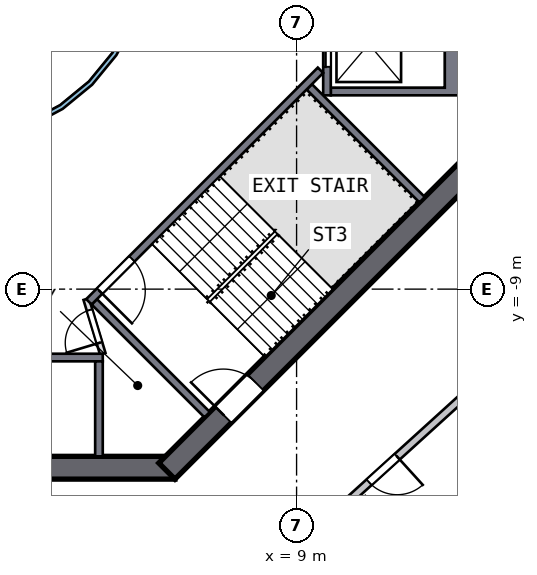
"""IFC4 building model, lengths in metres.
Left out: names, types, materials, properties, quantities, classifications, styles, units other than length and angle.
Written with IfcOpenShell. Run it as: python <this file> out.ifc"""

import sys

from ifc_helpers import new_model, si_unit, direction, frame, frame_2d, origin, place, context, subcontext, project, spatial, polyline, rectangle, outline, extrude, element, fill, save


model = new_model("IFC4")
c1 = context("Model", 3, precision=1e-05, world=origin(), true_north=direction((0.0, 1.0)))
c2 = subcontext(c1, "Body", "Model", "MODEL_VIEW")
j1 = project(units=[si_unit("LENGTHUNIT", "METRE"), si_unit("PLANEANGLEUNIT", "RADIAN")], contexts=[c1])
p1 = place(None, origin())
s1 = spatial("IfcSite", under=j1, at=p1, CompositionType="ELEMENT")
p2 = place(p1, origin())
s2 = spatial("IfcBuilding", under=s1, at=p2, CompositionType="ELEMENT")
p3 = place(p2, frame((0.0, 0.0, 205.5)))
s3 = spatial("IfcBuildingStorey", under=s2, at=p3, CompositionType="ELEMENT", Elevation=205.5)
p4 = place(p3, frame((-5.799, -13.7, 0.0), z_axis=(0.0, 0.0, 1.0), x_axis=(1.0, 0.0, 0.0)))
e1 = element("IfcWall", 1, at=p4, inside=s3, PredefinedType="SHEAR", context=c2, shape_type="SweptSolid", body=[
    extrude(rectangle(XDim=11.598, YDim=0.6, at=frame_2d((5.799, 0.0))), origin(), (0.0, 0.0, 1.0), 3.5),
])
p5 = place(p3, frame((5.587, -13.788, 0.0), z_axis=(0.0, 0.0, 1.0), x_axis=(0.707106781, 0.707106781, 0.0)))
e2 = element("IfcWall", 2, at=p5, inside=s3, PredefinedType="SHEAR", context=c2, shape_type="SweptSolid", body=[
    extrude(rectangle(XDim=11.598, YDim=0.6, at=frame_2d((5.799, 0.0))), origin(), (0.0, 0.0, 1.0), 3.5),
])
p6 = place(p5, frame((2.099, 0.0, 0.0)))
e3 = element("IfcOpeningElement", 3, at=p6, cuts=e2, PredefinedType="OPENING", context=c2, shape_type="SweptSolid", body=[
    extrude(rectangle(XDim=1.2, YDim=2.1, at=frame_2d((0.6, 1.05))), frame((0.0, 0.31, 0.0), z_axis=(0.0, -1.0, 0.0), x_axis=(1.0, 0.0, 0.0)), (0.0, 0.0, 1.0), 0.62),
])
p7 = place(p3, origin())
e4 = element("IfcWall", 4, at=p7, inside=s3, PredefinedType="SOLIDWALL", context=c2, shape_type="SweptSolid", body=[
    extrude(outline(polyline([(13.4, -3.9), (9.9, -3.9), (9.9, -3.7), (12.9, -3.7), (12.9, -1.4), (9.9, -1.4), (9.9, -1.2), (13.4, -1.2), (13.4, -3.9)])), origin(), (0.0, 0.0, 1.0), 3.19),
])
p8 = place(p3, frame((9.8, -1.2, 0.0), z_axis=(0.0, 0.0, 1.0), x_axis=(0.0, -1.0, 0.0)))
e5 = element("IfcWall", 5, at=p8, inside=s3, PredefinedType="SOLIDWALL", context=c2, shape_type="SweptSolid", body=[
    extrude(rectangle(XDim=2.7, YDim=0.2, at=frame_2d((1.35, 0.0))), origin(), (0.0, 0.0, 1.0), 3.19),
])
p9 = place(p8, frame((0.75, 0.0, 0.0)))
e6 = element("IfcOpeningElement", 6, at=p9, cuts=e5, PredefinedType="OPENING", context=c2, shape_type="SweptSolid", body=[
    extrude(rectangle(XDim=1.2, YDim=2.1, at=frame_2d((0.6, 1.05))), frame((0.0, 0.11, 0.0), z_axis=(0.0, -1.0, 0.0), x_axis=(1.0, 0.0, 0.0)), (0.0, 0.0, 1.0), 0.22),
])
p10 = place(p3, frame((-3.9, -10.8, 0.0), z_axis=(0.0, 0.0, 1.0), x_axis=(1.0, 0.0, 0.0)))
e7 = element("IfcWall", 7, at=p10, inside=s3, PredefinedType="SOLIDWALL", context=c2, shape_type="SweptSolid", body=[
    extrude(rectangle(XDim=7.8, YDim=0.2, at=frame_2d((3.9, 0.0))), origin(), (0.0, 0.0, 1.0), 3.19),
])
p11 = place(p10, frame((3.45, 0.0, 0.0)))
e8 = element("IfcOpeningElement", 8, at=p11, cuts=e7, PredefinedType="OPENING", context=c2, shape_type="SweptSolid", body=[
    extrude(rectangle(XDim=0.9, YDim=2.1, at=frame_2d((0.45, 1.05))), frame((0.0, 0.11, 0.0), z_axis=(0.0, -1.0, 0.0), x_axis=(1.0, 0.0, 0.0)), (0.0, 0.0, 1.0), 0.22),
])
p12 = place(p3, frame((3.8, -10.9, 0.0), z_axis=(0.0, 0.0, 1.0), x_axis=(0.0, -1.0, 0.0)))
e9 = element("IfcWall", 9, at=p12, inside=s3, PredefinedType="SOLIDWALL", context=c2, shape_type="SweptSolid", body=[
    extrude(rectangle(XDim=2.5, YDim=0.2, at=frame_2d((1.25, 0.0))), origin(), (0.0, 0.0, 1.0), 3.19),
])
p13 = place(p3, frame((9.629, -3.24, 0.0), z_axis=(0.0, 0.0, 1.0), x_axis=(-0.707120946, -0.707092617, 0.0)))
e10 = element("IfcWall", 10, at=p13, inside=s3, PredefinedType="SOLIDWALL", context=c2, shape_type="SweptSolid", body=[
    extrude(rectangle(XDim=8.618, YDim=0.2, at=frame_2d((4.309, 0.0))), origin(), (0.0, 0.0, 1.0), 3.19),
])
p14 = place(p13, frame((7.018, 0.0, 0.0)))
e11 = element("IfcOpeningElement", 11, at=p14, cuts=e10, PredefinedType="OPENING", context=c2, shape_type="SweptSolid", body=[
    extrude(rectangle(XDim=1.2, YDim=2.1, at=frame_2d((0.6, 1.05))), frame((0.0, 0.11, 0.0), z_axis=(0.0, -1.0, 0.0), x_axis=(1.0, 0.0, 0.0)), (0.0, 0.0, 1.0), 0.22),
])
for number, where, z_axis, x_axis in (
    (12, (3.677, -9.334, 0.0), (0.0, 0.0, 1.0), (0.707, -0.707, 0.0)),
    (13, (9.334, -3.677, 0.0), (0.0, 0.0, 1.0), (0.707, -0.707, 0.0)),
):
    element("IfcWall", number, at=place(p3, frame(where, z_axis=z_axis, x_axis=x_axis)), inside=s3, PredefinedType="SOLIDWALL", context=c2, shape_type="SweptSolid", body=[
        extrude(rectangle(XDim=4.2, YDim=0.2, at=frame_2d((2.1, 0.0))), origin(), (0.0, 0.0, 1.0), 3.19),
    ])
p15 = place(p3, frame((3.9, -10.7, 0.0), z_axis=(0.0, 0.0, 1.0), x_axis=(-0.289808785, 0.957084567, 0.0)))
e14 = element("IfcWall", 14, at=p15, inside=s3, PredefinedType="PARTITIONING", context=c2, shape_type="SweptSolid", body=[
    extrude(rectangle(XDim=1.501, YDim=0.15, at=frame_2d((0.75, 0.0))), origin(), (0.0, 0.0, 1.0), 3.19),
])
p16 = place(p15, frame((0.301, 0.0, 0.0)))
e15 = element("IfcOpeningElement", 15, at=p16, cuts=e14, PredefinedType="OPENING", context=c2, shape_type="SweptSolid", body=[
    extrude(rectangle(XDim=0.9, YDim=2.1, at=frame_2d((0.45, 1.05))), frame((0.0, 0.085, 0.0), z_axis=(0.0, -1.0, 0.0), x_axis=(1.0, 0.0, 0.0)), (0.0, 0.0, 1.0), 0.17),
])
p17 = place(p3, origin())
e16 = element("IfcWall", 16, at=p17, inside=s3, PredefinedType="SOLIDWALL", context=c2, shape_type="SweptSolid", body=[
    extrude(outline(polyline([(5.021, -0.999), (4.73, -1.959), (4.257, -2.844), (3.62, -3.62), (2.844, -4.257), (1.959, -4.73), (0.999, -5.021), (0.0, -5.12), (-0.999, -5.021), (-1.959, -4.73), (-2.844, -4.257), (-3.62, -3.62), (-4.257, -2.844), (-4.73, -1.959), (-5.021, -0.999), (-5.12, 0.0), (-5.021, 0.999), (-4.73, 1.959), (-4.257, 2.844), (-3.62, 3.62), (-2.844, 4.257), (-1.959, 4.73), (-0.999, 5.021), (0.0, 5.12), (0.999, 5.021), (1.959, 4.73), (2.844, 4.257), (3.62, 3.62), (4.257, 2.844), (4.73, 1.959), (5.021, 0.999), (5.12, 0.0), (5.021, -0.999)]), holes=[polyline([(4.904, 0.976), (4.619, 1.913), (4.157, 2.778), (3.535, 3.535), (2.778, 4.157), (1.913, 4.619), (0.976, 4.904), (0.0, 5.0), (-0.976, 4.904), (-1.913, 4.619), (-2.778, 4.157), (-3.535, 3.535), (-4.157, 2.778), (-4.619, 1.913), (-4.904, 0.976), (-5.0, 0.0), (-4.904, -0.976), (-4.619, -1.913), (-4.157, -2.778), (-3.535, -3.535), (-2.778, -4.157), (-1.913, -4.619), (-0.976, -4.904), (0.0, -5.0), (0.976, -4.904), (1.913, -4.619), (2.778, -4.157), (3.535, -3.535), (4.157, -2.778), (4.619, -1.913), (4.904, -0.976), (5.0, 0.0), (4.904, 0.976)])]), origin(), (0.0, 0.0, 1.0), 3.19),
])
p18 = place(p3, frame((15.46, -9.948, 0.0), z_axis=(0.0, 0.0, 1.0), x_axis=(-0.740327695, -0.672246163, 0.0)))
e17 = element("IfcWall", 17, at=p18, inside=s3, PredefinedType="SOLIDWALL", context=c2, shape_type="SweptSolid", body=[
    extrude(rectangle(XDim=9.316, YDim=0.2, at=frame_2d((4.658, 0.0))), origin(), (0.0, 0.0, 1.0), 3.19),
])
p19 = place(p18, frame((5.15, 0.0, 0.0)))
e18 = element("IfcOpeningElement", 18, at=p19, cuts=e17, PredefinedType="OPENING", context=c2, shape_type="SweptSolid", body=[
    extrude(rectangle(XDim=1.0, YDim=2.1, at=frame_2d((0.5, 1.05))), frame((0.0, 0.11, 0.0), z_axis=(0.0, -1.0, 0.0), x_axis=(1.0, 0.0, 0.0)), (0.0, 0.0, 1.0), 0.22),
])
p20 = place(p9, origin())
e19 = element("IfcDoor", 19, at=p20, inside=s3, OperationType="DOUBLE_DOOR_SLIDING", PredefinedType="DOOR", context=c2, shape_type="SweptSolid", body=[
    extrude(rectangle(XDim=1.2, YDim=2.1, at=frame_2d((0.6, 1.05))), frame((0.0, 0.025, 0.0), z_axis=(0.0, -1.0, 0.0), x_axis=(1.0, 0.0, 0.0)), (0.0, 0.0, 1.0), 0.05),
])
fill(e6, e19)
p21 = place(p14, origin())
e20 = element("IfcDoor", 20, at=p21, inside=s3, OperationType="SINGLE_SWING_RIGHT", PredefinedType="DOOR", context=c2, shape_type="SweptSolid", body=[
    extrude(rectangle(XDim=1.2, YDim=2.1, at=frame_2d((0.6, 1.05))), frame((0.0, 0.025, 0.0), z_axis=(0.0, -1.0, 0.0), x_axis=(1.0, 0.0, 0.0)), (0.0, 0.0, 1.0), 0.05),
])
fill(e11, e20)
p22 = place(p6, origin())
e21 = element("IfcDoor", 21, at=p22, inside=s3, OperationType="SINGLE_SWING_LEFT", PredefinedType="DOOR", context=c2, shape_type="SweptSolid", body=[
    extrude(rectangle(XDim=1.2, YDim=2.1, at=frame_2d((0.6, 1.05))), frame((0.0, 0.025, 0.0), z_axis=(0.0, -1.0, 0.0), x_axis=(1.0, 0.0, 0.0)), (0.0, 0.0, 1.0), 0.05),
])
fill(e3, e21)
p23 = place(p16, origin())
e22 = element("IfcDoor", 22, at=p23, inside=s3, OperationType="SINGLE_SWING_LEFT", PredefinedType="DOOR", context=c2, shape_type="SweptSolid", body=[
    extrude(rectangle(XDim=0.9, YDim=2.1, at=frame_2d((0.45, 1.05))), frame((0.0, 0.025, 0.0), z_axis=(0.0, -1.0, 0.0), x_axis=(1.0, 0.0, 0.0)), (0.0, 0.0, 1.0), 0.05),
])
fill(e15, e22)
p24 = place(p19, origin())
e23 = element("IfcDoor", 23, at=p24, inside=s3, OperationType="SINGLE_SWING_LEFT", PredefinedType="DOOR", context=c2, shape_type="SweptSolid", body=[
    extrude(rectangle(XDim=1.0, YDim=2.1, at=frame_2d((0.5, 1.05))), frame((0.0, 0.025, 0.0), z_axis=(0.0, -1.0, 0.0), x_axis=(1.0, 0.0, 0.0)), (0.0, 0.0, 1.0), 0.05),
])
fill(e18, e23)
save(model, sys.argv[1])
